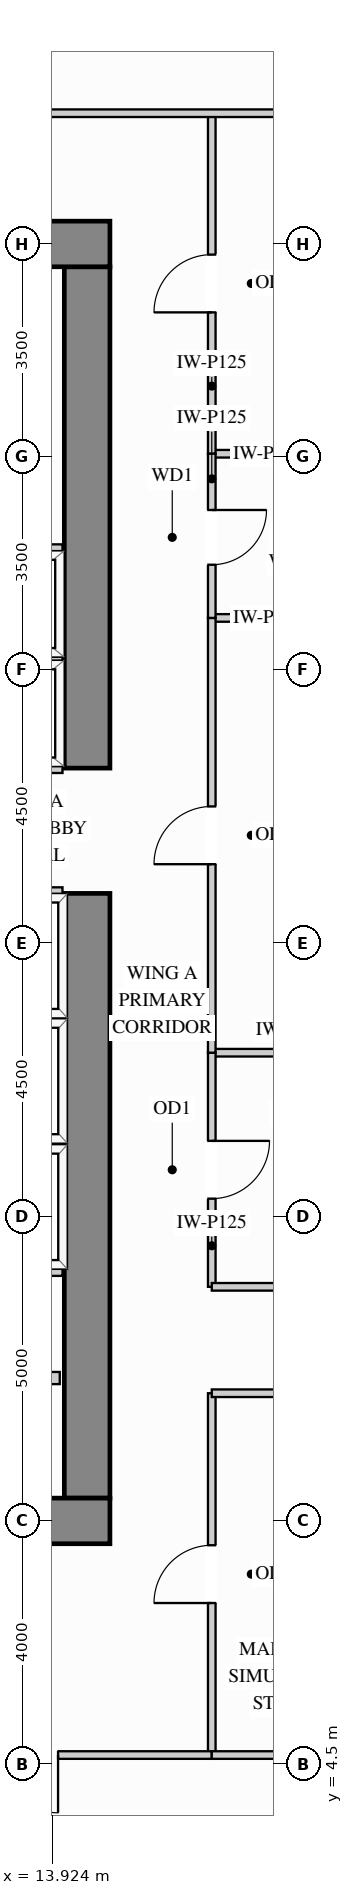
"""IFC4 building model, lengths in metres.
Left out: names, types, materials, properties, quantities, classifications, styles, units other than length and angle.
Written with IfcOpenShell. Run it as: python <this file> out.ifc"""

import sys

from ifc_helpers import new_model, si_unit, direction, frame, frame_2d, origin, place, context, subcontext, project, spatial, rectangle, extrude, source, transform, mapped, element, fill, save


model = new_model("IFC4")
c1 = context("Model", 3, precision=1e-05, world=origin(), true_north=direction((0.0, 1.0)))
c2 = subcontext(c1, "Body", "Model", "MODEL_VIEW")
j1 = project(units=[si_unit("LENGTHUNIT", "METRE"), si_unit("PLANEANGLEUNIT", "RADIAN")], contexts=[c1])
p1 = place(None, origin())
s1 = spatial("IfcSite", under=j1, at=p1, CompositionType="ELEMENT")
p2 = place(p1, origin())
s2 = spatial("IfcBuilding", under=s1, at=p2, CompositionType="ELEMENT")
p3 = place(p2, frame((0.0, 0.0, 77.4)))
s3 = spatial("IfcBuildingStorey", under=s2, at=p3, CompositionType="ELEMENT", Elevation=77.4)
m1 = source(origin(), c2, "Body", "SweptSolid", [
    extrude(rectangle(XDim=9.945, YDim=0.75, at=frame_2d((4.973, 0.0))), origin(), (0.0, 0.0, 1.0), 3.38),
])
p4 = place(p3, frame((14.5, 8.875, 0.0), z_axis=(0.0, 0.0, 1.0), x_axis=(0.0, 1.0, 0.0)))
e1 = element("IfcWall", 1, at=p4, inside=s3, PredefinedType="SHEAR", context=c2, shape_type="MappedRepresentation", body=[
    mapped(m1, transform((0.0, 0.0, 0.0), x_axis=(1.0, 0.0, 0.0), y_axis=(0.0, 1.0, 0.0), z_axis=(0.0, 0.0, 1.0))),
])
m2 = source(origin(), c2, "Body", "SweptSolid", [
    extrude(rectangle(XDim=8.245, YDim=0.75, at=frame_2d((4.123, 0.0))), origin(), (0.0, 0.0, 1.0), 3.38),
])
p5 = place(p3, frame((14.5, 20.88, 0.0), z_axis=(0.0, 0.0, 1.0), x_axis=(0.0, 1.0, 0.0)))
e2 = element("IfcWall", 2, at=p5, inside=s3, PredefinedType="SHEAR", context=c2, shape_type="MappedRepresentation", body=[
    mapped(m2, transform((0.0, 0.0, 0.0), x_axis=(1.0, 0.0, 0.0), y_axis=(0.0, 1.0, 0.0), z_axis=(0.0, 0.0, 1.0))),
])
m3 = source(origin(), c2, "Body", "SweptSolid", [
    extrude(rectangle(XDim=10.75, YDim=0.75, at=frame_2d((5.375, 0.0))), origin(), (0.0, 0.0, 1.0), 3.38),
])
for number, where, z_axis, x_axis in (
    (3, (4.125, 29.5, 0.0), (0.0, 0.0, 1.0), (1.0, 0.0, 0.0)),
    (4, (4.125, 8.5, 0.0), (0.0, 0.0, 1.0), (1.0, 0.0, 0.0)),
):
    element("IfcWall", number, at=place(p3, frame(where, z_axis=z_axis, x_axis=x_axis)), inside=s3, PredefinedType="SHEAR", context=c2, shape_type="MappedRepresentation", body=[
        mapped(m3, transform((0.0, 0.0, 0.0), x_axis=(1.0, 0.0, 0.0), y_axis=(0.0, 1.0, 0.0), z_axis=(0.0, 0.0, 1.0))),
    ])
m4 = source(origin(), c2, "Body", "SweptSolid", [
    extrude(rectangle(XDim=2.6, YDim=0.125, at=frame_2d((1.3, 0.0))), origin(), (0.0, 0.0, 1.0), 3.365),
])
p6 = place(p3, frame((16.55, 16.2, 0.0), z_axis=(0.0, 0.0, 1.0), x_axis=(1.0, 0.0, 0.0)))
e5 = element("IfcWall", 5, at=p6, inside=s3, PredefinedType="PARTITIONING", context=c2, shape_type="MappedRepresentation", body=[
    mapped(m4, transform((0.0, 0.0, 0.0), x_axis=(1.0, 0.0, 0.0), y_axis=(0.0, 1.0, 0.0), z_axis=(0.0, 0.0, 1.0))),
])
m5 = source(origin(), c2, "Body", "SweptSolid", [
    extrude(rectangle(XDim=2.598, YDim=0.125, at=frame_2d((1.299, 0.0))), origin(), (0.0, 0.0, 1.0), 3.365),
])
for number, where, z_axis, x_axis in (
    (6, (16.55, 23.35, 0.0), (0.0, 0.0, 1.0), (1.0, 0.0, 0.0)),
    (7, (16.55, 26.05, 0.0), (0.0, 0.0, 1.0), (1.0, 0.0, 0.0)),
):
    element("IfcWall", number, at=place(p3, frame(where, z_axis=z_axis, x_axis=x_axis)), inside=s3, PredefinedType="PARTITIONING", context=c2, shape_type="MappedRepresentation", body=[
        mapped(m5, transform((0.0, 0.0, 0.0), x_axis=(1.0, 0.0, 0.0), y_axis=(0.0, 1.0, 0.0), z_axis=(0.0, 0.0, 1.0))),
    ])
p7 = place(p3, frame((16.55, 12.35, 0.0), z_axis=(0.0, 0.0, 1.0), x_axis=(0.0, 1.0, 0.0)))
e8 = element("IfcWall", 8, at=p7, inside=s3, PredefinedType="PARTITIONING", context=c2, shape_type="SweptSolid", body=[
    extrude(rectangle(XDim=3.85, YDim=0.125, at=frame_2d((1.925, 0.0))), origin(), (0.0, 0.0, 1.0), 3.365),
])
p8 = place(p7, frame((1.45, 0.0, 0.0)))
e9 = element("IfcOpeningElement", 9, at=p8, cuts=e8, PredefinedType="OPENING", context=c2, shape_type="SweptSolid", body=[
    extrude(rectangle(XDim=0.95, YDim=2.15, at=frame_2d((0.475, 1.075))), frame((0.0, 0.073, 0.0), z_axis=(0.0, -1.0, 0.0), x_axis=(1.0, 0.0, 0.0)), (0.0, 0.0, 1.0), 0.145),
])
p9 = place(p3, frame((16.55, 16.2, 0.0), z_axis=(0.0, 0.0, 1.0), x_axis=(0.0, 1.0, 0.0)))
e10 = element("IfcWall", 10, at=p9, inside=s3, PredefinedType="PARTITIONING", context=c2, shape_type="SweptSolid", body=[
    extrude(rectangle(XDim=7.15, YDim=0.125, at=frame_2d((3.575, 0.0))), origin(), (0.0, 0.0, 1.0), 3.365),
])
p10 = place(p9, frame((3.1, 0.0, 0.0)))
e11 = element("IfcOpeningElement", 11, at=p10, cuts=e10, PredefinedType="OPENING", context=c2, shape_type="SweptSolid", body=[
    extrude(rectangle(XDim=0.95, YDim=2.15, at=frame_2d((0.475, 1.075))), frame((0.0, 0.073, 0.0), z_axis=(0.0, -1.0, 0.0), x_axis=(1.0, 0.0, 0.0)), (0.0, 0.0, 1.0), 0.145),
])
p11 = place(p3, frame((16.55, 26.05, 0.0), z_axis=(0.0, 0.0, 1.0), x_axis=(0.0, 1.0, 0.0)))
e12 = element("IfcWall", 12, at=p11, inside=s3, PredefinedType="PARTITIONING", context=c2, shape_type="SweptSolid", body=[
    extrude(rectangle(XDim=5.6, YDim=0.125, at=frame_2d((2.8, 0.0))), origin(), (0.0, 0.0, 1.0), 3.365),
])
p12 = place(p11, frame((2.325, 0.0, 0.0)))
e13 = element("IfcOpeningElement", 13, at=p12, cuts=e12, PredefinedType="OPENING", context=c2, shape_type="SweptSolid", body=[
    extrude(rectangle(XDim=0.95, YDim=2.15, at=frame_2d((0.475, 1.075))), frame((0.0, 0.073, 0.0), z_axis=(0.0, -1.0, 0.0), x_axis=(1.0, 0.0, 0.0)), (0.0, 0.0, 1.0), 0.145),
])
p13 = place(p3, frame((16.55, 4.65, 0.0), z_axis=(0.0, 0.0, 1.0), x_axis=(0.0, 1.0, 0.0)))
e14 = element("IfcWall", 14, at=p13, inside=s3, PredefinedType="PARTITIONING", context=c2, shape_type="SweptSolid", body=[
    extrude(rectangle(XDim=5.95, YDim=0.125, at=frame_2d((2.975, 0.0))), origin(), (0.0, 0.0, 1.0), 3.365),
])
p14 = place(p13, frame((2.5, 0.0, 0.0)))
e15 = element("IfcOpeningElement", 15, at=p14, cuts=e14, PredefinedType="OPENING", context=c2, shape_type="SweptSolid", body=[
    extrude(rectangle(XDim=0.95, YDim=2.15, at=frame_2d((0.475, 1.075))), frame((0.0, 0.073, 0.0), z_axis=(0.0, -1.0, 0.0), x_axis=(1.0, 0.0, 0.0)), (0.0, 0.0, 1.0), 0.145),
])
p15 = place(p3, frame((16.55, 23.35, 0.0), z_axis=(0.0, 0.0, 1.0), x_axis=(0.0, 1.0, 0.0)))
e16 = element("IfcWall", 16, at=p15, inside=s3, PredefinedType="PARTITIONING", context=c2, shape_type="SweptSolid", body=[
    extrude(rectangle(XDim=2.7, YDim=0.125, at=frame_2d((1.35, 0.0))), origin(), (0.0, 0.0, 1.0), 3.365),
])
p16 = place(p15, frame((0.875, 0.0, 0.0)))
e17 = element("IfcOpeningElement", 17, at=p16, cuts=e16, PredefinedType="OPENING", context=c2, shape_type="SweptSolid", body=[
    extrude(rectangle(XDim=0.9, YDim=2.15, at=frame_2d((0.45, 1.075))), frame((0.0, 0.073, 0.0), z_axis=(0.0, -1.0, 0.0), x_axis=(1.0, 0.0, 0.0)), (0.0, 0.0, 1.0), 0.145),
])
m6 = source(origin(), c2, "Body", "SweptSolid", [
    extrude(rectangle(XDim=7.498, YDim=0.125, at=frame_2d((3.749, 0.0))), origin(), (0.0, 0.0, 1.0), 2.828),
])
p17 = place(p3, frame((11.65, 31.65, 0.0), z_axis=(0.0, 0.0, 1.0), x_axis=(1.0, 0.0, 0.0)))
e18 = element("IfcWall", 18, at=p17, inside=s3, PredefinedType="PARTITIONING", context=c2, shape_type="MappedRepresentation", body=[
    mapped(m6, transform((0.0, 0.0, 0.0), x_axis=(1.0, 0.0, 0.0), y_axis=(0.0, 1.0, 0.0), z_axis=(0.0, 0.0, 1.0))),
])
m7 = source(origin(), c2, "Body", "SweptSolid", [
    extrude(rectangle(XDim=2.95, YDim=0.125, at=frame_2d((1.475, 0.0))), origin(), (0.0, 0.0, 1.0), 3.365),
])
for number, where, z_axis, x_axis in (
    (19, (16.55, 12.35, 0.0), (0.0, 0.0, 1.0), (1.0, 0.0, 0.0)),
    (20, (16.55, 10.6, 0.0), (0.0, 0.0, 1.0), (1.0, 0.0, 0.0)),
):
    element("IfcWall", number, at=place(p3, frame(where, z_axis=z_axis, x_axis=x_axis)), inside=s3, PredefinedType="PARTITIONING", context=c2, shape_type="MappedRepresentation", body=[
        mapped(m7, transform((0.0, 0.0, 0.0), x_axis=(1.0, 0.0, 0.0), y_axis=(0.0, 1.0, 0.0), z_axis=(0.0, 0.0, 1.0))),
    ])
p18 = place(p3, frame((10.544, 4.65, 0.0), z_axis=(0.0, 0.0, 1.0), x_axis=(1.0, 0.0, 0.0)))
e21 = element("IfcWall", 21, at=p18, inside=s3, PredefinedType="PARTITIONING", context=c2, shape_type="SweptSolid", body=[
    extrude(rectangle(XDim=6.006, YDim=0.125, at=frame_2d((3.003, 0.0))), origin(), (0.0, 0.0, 1.0), 2.828),
])
p19 = place(p18, frame((2.528, 0.0, 0.0)))
e22 = element("IfcOpeningElement", 22, at=p19, cuts=e21, PredefinedType="OPENING", context=c2, shape_type="SweptSolid", body=[
    extrude(rectangle(XDim=0.95, YDim=2.15, at=frame_2d((0.475, 1.075))), frame((0.0, 0.073, 0.0), z_axis=(0.0, -1.0, 0.0), x_axis=(1.0, 0.0, 0.0)), (0.0, 0.0, 1.0), 0.145),
])
m8 = source(origin(), c2, "Body", "SweptSolid", [
    extrude(rectangle(XDim=2.6, YDim=0.125, at=frame_2d((1.3, 0.0))), origin(), (0.0, 0.0, 1.0), 2.828),
])
p20 = place(p3, frame((16.55, 4.65, 0.0), z_axis=(0.0, 0.0, 1.0), x_axis=(1.0, 0.0, 0.0)))
e23 = element("IfcWall", 23, at=p20, inside=s3, PredefinedType="PARTITIONING", context=c2, shape_type="MappedRepresentation", body=[
    mapped(m8, transform((0.0, 0.0, 0.0), x_axis=(1.0, 0.0, 0.0), y_axis=(0.0, 1.0, 0.0), z_axis=(0.0, 0.0, 1.0))),
])
m9 = source(origin(), c2, "Body", "SweptSolid", [
    extrude(rectangle(XDim=1.63, YDim=0.2, at=frame_2d((0.815, 0.0))), origin(), (0.0, 0.0, 1.0), 3.365),
])
p21 = place(p3, frame((12.42, 10.85, 0.0), z_axis=(0.0, 0.0, 1.0), x_axis=(1.0, 0.0, 0.0)))
e24 = element("IfcWall", 24, at=p21, inside=s3, PredefinedType="PARTITIONING", context=c2, shape_type="MappedRepresentation", body=[
    mapped(m9, transform((0.0, 0.0, 0.0), x_axis=(1.0, 0.0, 0.0), y_axis=(0.0, 1.0, 0.0), z_axis=(0.0, 0.0, 1.0))),
])
m10 = source(origin(), c2, "Body", "SweptSolid", [
    extrude(rectangle(XDim=2.265, YDim=0.2, at=frame_2d((1.132, 0.0))), origin(), (0.0, 0.0, 1.0), 3.365),
])
for number, where, z_axis, x_axis in (
    (25, (11.83, 22.66, 0.0), (0.0, 0.0, 1.0), (1.0, 0.0, 0.0)),
    (26, (11.83, 20.9, 0.0), (0.0, 0.0, 1.0), (1.0, 0.0, 0.0)),
    (27, (11.83, 24.46, 0.0), (0.0, 0.0, 1.0), (1.0, 0.0, 0.0)),
):
    element("IfcWall", number, at=place(p3, frame(where, z_axis=z_axis, x_axis=x_axis)), inside=s3, PredefinedType="PARTITIONING", context=c2, shape_type="MappedRepresentation", body=[
        mapped(m10, transform((0.0, 0.0, 0.0), x_axis=(1.0, 0.0, 0.0), y_axis=(0.0, 1.0, 0.0), z_axis=(0.0, 0.0, 1.0))),
    ])
m11 = source(origin(), c2, "Body", "SweptSolid", [
    extrude(rectangle(XDim=1.865, YDim=0.2, at=frame_2d((0.933, 0.0))), origin(), (0.0, 0.0, 1.0), 3.365),
])
for number, where, z_axis, x_axis in (
    (28, (12.23, 14.7, 0.0), (0.0, 0.0, 1.0), (1.0, 0.0, 0.0)),
    (29, (12.23, 12.63, 0.0), (0.0, 0.0, 1.0), (1.0, 0.0, 0.0)),
    (30, (12.23, 16.77, 0.0), (0.0, 0.0, 1.0), (1.0, 0.0, 0.0)),
    (31, (12.23, 18.82, 0.0), (0.0, 0.0, 1.0), (1.0, 0.0, 0.0)),
):
    element("IfcWall", number, at=place(p3, frame(where, z_axis=z_axis, x_axis=x_axis)), inside=s3, PredefinedType="PARTITIONING", context=c2, shape_type="MappedRepresentation", body=[
        mapped(m11, transform((0.0, 0.0, 0.0), x_axis=(1.0, 0.0, 0.0), y_axis=(0.0, 1.0, 0.0), z_axis=(0.0, 0.0, 1.0))),
    ])
m12 = source(origin(), c2, "Body", "SweptSolid", [
    extrude(rectangle(XDim=0.95, YDim=2.15, at=frame_2d((0.475, 1.075))), frame((0.0, 0.025, 0.0), z_axis=(0.0, -1.0, 0.0), x_axis=(1.0, 0.0, 0.0)), (0.0, 0.0, 1.0), 0.05),
])
p22 = place(p14, origin())
e32 = element("IfcDoor", 32, at=p22, inside=s3, OperationType="SINGLE_SWING_LEFT", PredefinedType="DOOR", context=c2, shape_type="MappedRepresentation", body=[
    mapped(m12, transform((0.0, 0.0, 0.0), x_axis=(1.0, 0.0, 0.0), y_axis=(0.0, 1.0, 0.0), z_axis=(0.0, 0.0, 1.0))),
])
fill(e15, e32)
p23 = place(p8, origin())
e33 = element("IfcDoor", 33, at=p23, inside=s3, OperationType="SINGLE_SWING_RIGHT", PredefinedType="DOOR", context=c2, shape_type="MappedRepresentation", body=[
    mapped(m12, transform((0.0, 0.0, 0.0), x_axis=(1.0, 0.0, 0.0), y_axis=(0.0, 1.0, 0.0), z_axis=(0.0, 0.0, 1.0))),
])
fill(e9, e33)
p24 = place(p10, origin())
e34 = element("IfcDoor", 34, at=p24, inside=s3, OperationType="SINGLE_SWING_LEFT", PredefinedType="DOOR", context=c2, shape_type="MappedRepresentation", body=[
    mapped(m12, transform((0.0, 0.0, 0.0), x_axis=(1.0, 0.0, 0.0), y_axis=(0.0, 1.0, 0.0), z_axis=(0.0, 0.0, 1.0))),
])
fill(e11, e34)
p25 = place(p12, origin())
e35 = element("IfcDoor", 35, at=p25, inside=s3, OperationType="SINGLE_SWING_LEFT", PredefinedType="DOOR", context=c2, shape_type="MappedRepresentation", body=[
    mapped(m12, transform((0.0, 0.0, 0.0), x_axis=(1.0, 0.0, 0.0), y_axis=(0.0, 1.0, 0.0), z_axis=(0.0, 0.0, 1.0))),
])
fill(e13, e35)
p26 = place(p19, origin())
e36 = element("IfcDoor", 36, at=p26, inside=s3, OperationType="SINGLE_SWING_RIGHT", PredefinedType="DOOR", context=c2, shape_type="MappedRepresentation", body=[
    mapped(m12, transform((0.0, 0.0, 0.0), x_axis=(1.0, 0.0, 0.0), y_axis=(0.0, 1.0, 0.0), z_axis=(0.0, 0.0, 1.0))),
])
fill(e22, e36)
m13 = source(origin(), c2, "Body", "SweptSolid", [
    extrude(rectangle(XDim=0.9, YDim=2.15, at=frame_2d((0.45, 1.075))), frame((0.0, 0.025, 0.0), z_axis=(0.0, -1.0, 0.0), x_axis=(1.0, 0.0, 0.0)), (0.0, 0.0, 1.0), 0.05),
])
p27 = place(p16, origin())
e37 = element("IfcDoor", 37, at=p27, inside=s3, OperationType="SINGLE_SWING_RIGHT", PredefinedType="DOOR", context=c2, shape_type="MappedRepresentation", body=[
    mapped(m13, transform((0.0, 0.0, 0.0), x_axis=(1.0, 0.0, 0.0), y_axis=(0.0, 1.0, 0.0), z_axis=(0.0, 0.0, 1.0))),
])
fill(e17, e37)
save(model, sys.argv[1])
